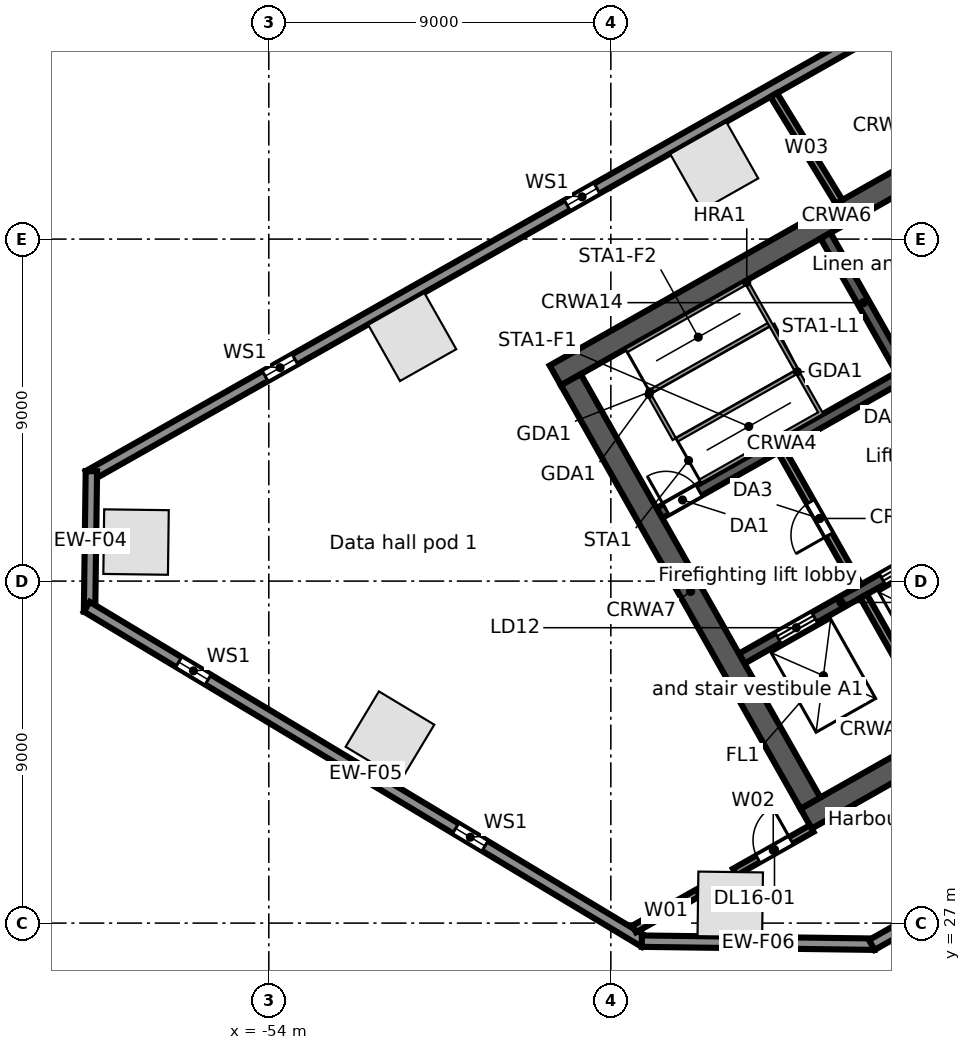
"""IFC4 building model, lengths in metres.
Left out: names, types, materials, properties, quantities, classifications, styles, units other than length and angle.
Written with IfcOpenShell. Run it as: python <this file> out.ifc"""

import sys

from ifc_helpers import new_model, si_unit, direction, frame, frame_2d, origin, origin_2d, place, context, subcontext, project, spatial, rectangle, extrude, element, fill, save


model = new_model("IFC4")
c1 = context("Model", 3, precision=1e-05, world=origin(), true_north=direction((0.0, 1.0)))
c2 = subcontext(c1, "Body", "Model", "MODEL_VIEW")
j1 = project(units=[si_unit("LENGTHUNIT", "METRE"), si_unit("PLANEANGLEUNIT", "RADIAN")], contexts=[c1])
p1 = place(None, origin())
s1 = spatial("IfcSite", under=j1, at=p1, CompositionType="ELEMENT")
p2 = place(p1, origin())
s2 = spatial("IfcBuilding", under=s1, at=p2, CompositionType="ELEMENT")
p3 = place(p2, frame((0.0, 0.0, 86.5)))
s3 = spatial("IfcBuildingStorey", under=s2, at=p3, CompositionType="ELEMENT", Elevation=86.5)
for number, where, z_axis, x_axis in (
    (1, (-42.28, 46.919, 0.0), (0.0, 0.0, 1.0), (-0.87, -0.492, 0.0)),
    (2, (-50.226, 42.423, 0.0), (0.0, 0.0, 1.0), (-0.87, -0.492, 0.0)),
    (3, (-57.493, 37.027, 0.0), (0.0, 0.0, 1.0), (-0.013, -1.0, 0.0)),
    (4, (-50.812, 31.931, 0.0), (0.0, 0.0, 1.0), (0.857, -0.515, 0.0)),
    (5, (-41.858, 27.495, 0.0), (0.0, 0.0, 1.0), (1.0, -0.013, 0.0)),
):
    element("IfcColumn", number, at=place(p3, frame(where, z_axis=z_axis, x_axis=x_axis)), inside=s3, PredefinedType="COLUMN", context=c2, shape_type="SweptSolid", body=[
        extrude(rectangle(XDim=1.7, YDim=1.7, at=origin_2d()), origin(), (0.0, 0.0, 1.0), 5.0),
    ])
p4 = place(p3, frame((-58.745, 38.764, 0.0), z_axis=(0.0, 0.0, 1.0), x_axis=(0.870355811726, 0.492423355453, 0.0)))
e6 = element("IfcWall", 6, at=p4, inside=s3, PredefinedType="STANDARD", context=c2, shape_type="SweptSolid", body=[
    extrude(rectangle(XDim=64.025, YDim=0.3, at=frame_2d((32.013, 0.0))), origin(), (0.0, 0.0, 1.0), 4.65),
])
p5 = place(p4, frame((60.122, 0.0, 0.6)))
e7 = element("IfcOpeningElement", 7, at=p5, cuts=e6, PredefinedType="OPENING", context=c2, shape_type="SweptSolid", body=[
    extrude(rectangle(XDim=0.9, YDim=3.2, at=frame_2d((0.45, 1.6))), frame((0.0, 0.16, 0.0), z_axis=(0.0, -1.0, 0.0), x_axis=(1.0, 0.0, 0.0)), (0.0, 0.0, 1.0), 0.32),
])
p6 = place(p4, frame((50.992, 0.0, 0.6)))
e8 = element("IfcOpeningElement", 8, at=p6, cuts=e6, PredefinedType="OPENING", context=c2, shape_type="SweptSolid", body=[
    extrude(rectangle(XDim=0.9, YDim=3.2, at=frame_2d((0.45, 1.6))), frame((0.0, 0.16, 0.0), z_axis=(0.0, -1.0, 0.0), x_axis=(1.0, 0.0, 0.0)), (0.0, 0.0, 1.0), 0.32),
])
p7 = place(p4, frame((41.862, 0.0, 0.6)))
e9 = element("IfcOpeningElement", 9, at=p7, cuts=e6, PredefinedType="OPENING", context=c2, shape_type="SweptSolid", body=[
    extrude(rectangle(XDim=0.9, YDim=3.2, at=frame_2d((0.45, 1.6))), frame((0.0, 0.16, 0.0), z_axis=(0.0, -1.0, 0.0), x_axis=(1.0, 0.0, 0.0)), (0.0, 0.0, 1.0), 0.32),
])
p8 = place(p4, frame((32.732, 0.0, 0.6)))
e10 = element("IfcOpeningElement", 10, at=p8, cuts=e6, PredefinedType="OPENING", context=c2, shape_type="SweptSolid", body=[
    extrude(rectangle(XDim=0.9, YDim=3.2, at=frame_2d((0.45, 1.6))), frame((0.0, 0.16, 0.0), z_axis=(0.0, -1.0, 0.0), x_axis=(1.0, 0.0, 0.0)), (0.0, 0.0, 1.0), 0.32),
])
p9 = place(p4, frame((23.602, 0.0, 0.6)))
e11 = element("IfcOpeningElement", 11, at=p9, cuts=e6, PredefinedType="OPENING", context=c2, shape_type="SweptSolid", body=[
    extrude(rectangle(XDim=0.9, YDim=3.2, at=frame_2d((0.45, 1.6))), frame((0.0, 0.16, 0.0), z_axis=(0.0, -1.0, 0.0), x_axis=(1.0, 0.0, 0.0)), (0.0, 0.0, 1.0), 0.32),
])
p10 = place(p4, frame((14.472, 0.0, 0.6)))
e12 = element("IfcOpeningElement", 12, at=p10, cuts=e6, PredefinedType="OPENING", context=c2, shape_type="SweptSolid", body=[
    extrude(rectangle(XDim=0.9, YDim=3.2, at=frame_2d((0.45, 1.6))), frame((0.0, 0.16, 0.0), z_axis=(0.0, -1.0, 0.0), x_axis=(1.0, 0.0, 0.0)), (0.0, 0.0, 1.0), 0.32),
])
p11 = place(p4, frame((5.342, 0.0, 0.6)))
e13 = element("IfcOpeningElement", 13, at=p11, cuts=e6, PredefinedType="OPENING", context=c2, shape_type="SweptSolid", body=[
    extrude(rectangle(XDim=0.9, YDim=3.2, at=frame_2d((0.45, 1.6))), frame((0.0, 0.16, 0.0), z_axis=(0.0, -1.0, 0.0), x_axis=(1.0, 0.0, 0.0)), (0.0, 0.0, 1.0), 0.32),
])
p12 = place(p3, frame((-58.717, 35.194, 0.0), z_axis=(0.0, 0.0, 1.0), x_axis=(0.013069053407, 0.999914596275, 0.0)))
e14 = element("IfcWall", 14, at=p12, inside=s3, PredefinedType="STANDARD", context=c2, shape_type="SweptSolid", body=[
    extrude(rectangle(XDim=3.699, YDim=0.3, at=frame_2d((1.849, 0.0))), origin(), (0.0, 0.0, 1.0), 4.65),
])
p13 = place(p3, frame((-44.109, 26.504, 0.0), z_axis=(0.0, 0.0, 1.0), x_axis=(-0.857169502585, 0.515034410344, 0.0)))
e15 = element("IfcWall", 15, at=p13, inside=s3, PredefinedType="STANDARD", context=c2, shape_type="SweptSolid", body=[
    extrude(rectangle(XDim=17.127, YDim=0.3, at=frame_2d((8.563, 0.0))), origin(), (0.0, 0.0, 1.0), 4.65),
])
p14 = place(p13, frame((13.403, 0.0, 0.6)))
e16 = element("IfcOpeningElement", 16, at=p14, cuts=e15, PredefinedType="OPENING", context=c2, shape_type="SweptSolid", body=[
    extrude(rectangle(XDim=0.9, YDim=3.2, at=frame_2d((0.45, 1.6))), frame((0.0, 0.16, 0.0), z_axis=(0.0, -1.0, 0.0), x_axis=(1.0, 0.0, 0.0)), (0.0, 0.0, 1.0), 0.32),
])
p15 = place(p13, frame((4.903, 0.0, 0.6)))
e17 = element("IfcOpeningElement", 17, at=p15, cuts=e15, PredefinedType="OPENING", context=c2, shape_type="SweptSolid", body=[
    extrude(rectangle(XDim=0.9, YDim=3.2, at=frame_2d((0.45, 1.6))), frame((0.0, 0.16, 0.0), z_axis=(0.0, -1.0, 0.0), x_axis=(1.0, 0.0, 0.0)), (0.0, 0.0, 1.0), 0.32),
])
p16 = place(p3, frame((-38.057, 26.445, 0.0), z_axis=(0.0, 0.0, 1.0), x_axis=(-0.999914086342, 0.013108010296, 0.0)))
e18 = element("IfcWall", 18, at=p16, inside=s3, PredefinedType="STANDARD", context=c2, shape_type="SweptSolid", body=[
    extrude(rectangle(XDim=6.128, YDim=0.3, at=frame_2d((3.064, 0.0))), origin(), (0.0, 0.0, 1.0), 4.65),
])
p17 = place(p3, frame((-0.055, 47.969, 0.0), z_axis=(0.0, 0.0, 1.0), x_axis=(-0.870355730478, -0.492423499058, 0.0)))
e19 = element("IfcWall", 19, at=p17, inside=s3, PredefinedType="STANDARD", context=c2, shape_type="SweptSolid", body=[
    extrude(rectangle(XDim=43.75, YDim=0.3, at=frame_2d((21.875, 0.0))), origin(), (0.0, 0.0, 1.0), 4.65),
])
p18 = place(p17, frame((39.977, 0.0, 0.6)))
e20 = element("IfcOpeningElement", 20, at=p18, cuts=e19, PredefinedType="OPENING", context=c2, shape_type="SweptSolid", body=[
    extrude(rectangle(XDim=0.9, YDim=3.2, at=frame_2d((0.45, 1.6))), frame((0.0, 0.16, 0.0), z_axis=(0.0, -1.0, 0.0), x_axis=(1.0, 0.0, 0.0)), (0.0, 0.0, 1.0), 0.32),
])
p19 = place(p17, frame((31.222, 0.0, 0.6)))
e21 = element("IfcOpeningElement", 21, at=p19, cuts=e19, PredefinedType="OPENING", context=c2, shape_type="SweptSolid", body=[
    extrude(rectangle(XDim=0.9, YDim=3.2, at=frame_2d((0.45, 1.6))), frame((0.0, 0.16, 0.0), z_axis=(0.0, -1.0, 0.0), x_axis=(1.0, 0.0, 0.0)), (0.0, 0.0, 1.0), 0.32),
])
p20 = place(p17, frame((22.468, 0.0, 0.6)))
e22 = element("IfcOpeningElement", 22, at=p20, cuts=e19, PredefinedType="OPENING", context=c2, shape_type="SweptSolid", body=[
    extrude(rectangle(XDim=0.9, YDim=3.2, at=frame_2d((0.45, 1.6))), frame((0.0, 0.16, 0.0), z_axis=(0.0, -1.0, 0.0), x_axis=(1.0, 0.0, 0.0)), (0.0, 0.0, 1.0), 0.32),
])
p21 = place(p17, frame((13.713, 0.0, 0.6)))
e23 = element("IfcOpeningElement", 23, at=p21, cuts=e19, PredefinedType="OPENING", context=c2, shape_type="SweptSolid", body=[
    extrude(rectangle(XDim=0.9, YDim=3.2, at=frame_2d((0.45, 1.6))), frame((0.0, 0.16, 0.0), z_axis=(0.0, -1.0, 0.0), x_axis=(1.0, 0.0, 0.0)), (0.0, 0.0, 1.0), 0.32),
])
p22 = place(p17, frame((4.959, 0.0, 0.6)))
e24 = element("IfcOpeningElement", 24, at=p22, cuts=e19, PredefinedType="OPENING", context=c2, shape_type="SweptSolid", body=[
    extrude(rectangle(XDim=0.9, YDim=3.2, at=frame_2d((0.45, 1.6))), frame((0.0, 0.16, 0.0), z_axis=(0.0, -1.0, 0.0), x_axis=(1.0, 0.0, 0.0)), (0.0, 0.0, 1.0), 0.32),
])
p23 = place(p3, frame((-39.862, 29.749, 0.0), z_axis=(0.0, 0.0, 1.0), x_axis=(0.870350116061, 0.492433422375, 0.0)))
e25 = element("IfcWall", 25, at=p23, inside=s3, PredefinedType="SOLIDWALL", context=c2, shape_type="SweptSolid", body=[
    extrude(rectangle(XDim=17.0, YDim=0.6, at=frame_2d((8.5, 0.0))), origin(), (0.0, 0.0, 1.0), 4.65),
])
p24 = place(p23, frame((7.2, 0.0, 0.0)))
e26 = element("IfcOpeningElement", 26, at=p24, cuts=e25, PredefinedType="OPENING", context=c2, shape_type="SweptSolid", body=[
    extrude(rectangle(XDim=1.2, YDim=2.1, at=frame_2d((0.6, 1.05))), frame((0.0, 0.31, 0.0), z_axis=(0.0, -1.0, 0.0), x_axis=(1.0, 0.0, 0.0)), (0.0, 0.0, 1.0), 0.62),
])
p25 = place(p3, frame((-41.556, 33.961, 0.0), z_axis=(0.0, 0.0, 1.0), x_axis=(0.870343731308, 0.492444706919, 0.0)))
e27 = element("IfcWall", 27, at=p25, inside=s3, PredefinedType="SOLIDWALL", context=c2, shape_type="SweptSolid", body=[
    extrude(rectangle(XDim=6.0, YDim=0.3, at=frame_2d((3.0, 0.0))), origin(), (0.0, 0.0, 1.0), 4.65),
])
p26 = place(p25, frame((1.1, 0.0, 0.0)))
e28 = element("IfcOpeningElement", 28, at=p26, cuts=e27, PredefinedType="OPENING", context=c2, shape_type="SweptSolid", body=[
    extrude(rectangle(XDim=1.1, YDim=2.1, at=frame_2d((0.55, 1.05))), frame((0.0, 0.16, 0.0), z_axis=(0.0, -1.0, 0.0), x_axis=(1.0, 0.0, 0.0)), (0.0, 0.0, 1.0), 0.32),
])
p27 = place(p25, frame((4.25, 0.0, 0.0)))
e29 = element("IfcOpeningElement", 29, at=p27, cuts=e27, PredefinedType="OPENING", context=c2, shape_type="SweptSolid", body=[
    extrude(rectangle(XDim=1.1, YDim=2.1, at=frame_2d((0.55, 1.05))), frame((0.0, 0.16, 0.0), z_axis=(0.0, -1.0, 0.0), x_axis=(1.0, 0.0, 0.0)), (0.0, 0.0, 1.0), 0.32),
])
p28 = place(p3, frame((-43.723, 37.791, 0.0), z_axis=(0.0, 0.0, 1.0), x_axis=(0.87035077051, 0.49243226567, 0.0)))
e30 = element("IfcWall", 30, at=p28, inside=s3, PredefinedType="SOLIDWALL", context=c2, shape_type="SweptSolid", body=[
    extrude(rectangle(XDim=7.4, YDim=0.3, at=frame_2d((3.7, 0.0))), origin(), (0.0, 0.0, 1.0), 4.65),
])
p29 = place(p28, frame((0.2, 0.0, 0.0)))
e31 = element("IfcOpeningElement", 31, at=p29, cuts=e30, PredefinedType="OPENING", context=c2, shape_type="SweptSolid", body=[
    extrude(rectangle(XDim=1.0, YDim=2.1, at=frame_2d((0.5, 1.05))), frame((0.0, 0.16, 0.0), z_axis=(0.0, -1.0, 0.0), x_axis=(1.0, 0.0, 0.0)), (0.0, 0.0, 1.0), 0.32),
])
p30 = place(p3, frame((-46.461, 41.412, 0.0), z_axis=(0.0, 0.0, 1.0), x_axis=(0.870350116061, 0.492433422375, 0.0)))
e32 = element("IfcWall", 32, at=p30, inside=s3, PredefinedType="SOLIDWALL", context=c2, shape_type="SweptSolid", body=[
    extrude(rectangle(XDim=17.0, YDim=0.6, at=frame_2d((8.5, 0.0))), origin(), (0.0, 0.0, 1.0), 4.65),
])
p31 = place(p3, frame((-46.052, 41.298, 0.0), z_axis=(0.0, 0.0, 1.0), x_axis=(0.492418598281, -0.870358503186, 0.0)))
e33 = element("IfcWall", 33, at=p31, inside=s3, PredefinedType="SOLIDWALL", context=c2, shape_type="SweptSolid", body=[
    extrude(rectangle(XDim=12.8, YDim=0.6, at=frame_2d((6.4, 0.0))), origin(), (0.0, 0.0, 1.0), 4.65),
])
p32 = place(p3, frame((-38.349, 35.603, 0.0), z_axis=(0.0, 0.0, 1.0), x_axis=(0.49241474071, -0.870360685654, 0.0)))
e34 = element("IfcWall", 34, at=p32, inside=s3, PredefinedType="SOLIDWALL", context=c2, shape_type="SweptSolid", body=[
    extrude(rectangle(XDim=4.05, YDim=0.2, at=frame_2d((2.025, 0.0))), origin(), (0.0, 0.0, 1.0), 4.65),
])
p33 = place(p3, frame((-40.516, 39.433, 0.0), z_axis=(0.0, 0.0, 1.0), x_axis=(0.492453559952, -0.87033872216, 0.0)))
e35 = element("IfcWall", 35, at=p33, inside=s3, PredefinedType="PARTITIONING", context=c2, shape_type="SweptSolid", body=[
    extrude(rectangle(XDim=4.1, YDim=0.2, at=frame_2d((2.05, 0.0))), origin(), (0.0, 0.0, 1.0), 4.65),
])
p34 = place(p33, frame((1.55, 0.0, 0.0)))
e36 = element("IfcOpeningElement", 36, at=p34, cuts=e35, PredefinedType="OPENING", context=c2, shape_type="SweptSolid", body=[
    extrude(rectangle(XDim=1.0, YDim=2.1, at=frame_2d((0.5, 1.05))), frame((0.0, 0.11, 0.0), z_axis=(0.0, -1.0, 0.0), x_axis=(1.0, 0.0, 0.0)), (0.0, 0.0, 1.0), 0.22),
])
p35 = place(p3, frame((-39.35, 45.09, 0.0), z_axis=(0.0, 0.0, 1.0), x_axis=(0.49241474071, -0.870360685654, 0.0)))
e37 = element("IfcWall", 37, at=p35, inside=s3, PredefinedType="SOLIDWALL", context=c2, shape_type="SweptSolid", body=[
    extrude(rectangle(XDim=4.05, YDim=0.3, at=frame_2d((2.025, 0.0))), origin(), (0.0, 0.0, 1.0), 4.65),
])
p36 = place(p3, frame((-44.386, 26.845, 0.0), z_axis=(0.0, 0.0, 1.0), x_axis=(0.870226201187, 0.492652371118, 0.0)))
e38 = element("IfcWall", 38, at=p36, inside=s3, PredefinedType="PARTITIONING", context=c2, shape_type="SweptSolid", body=[
    extrude(rectangle(XDim=1.933, YDim=0.2, at=frame_2d((0.966, 0.0))), origin(), (0.0, 0.0, 1.0), 4.65),
])
p37 = place(p3, frame((-41.738, 28.343, 0.0), z_axis=(0.0, 0.0, 1.0), x_axis=(0.870265350095, 0.492583211676, 0.0)))
e39 = element("IfcWall", 39, at=p37, inside=s3, PredefinedType="PARTITIONING", context=c2, shape_type="SweptSolid", body=[
    extrude(rectangle(XDim=2.324, YDim=0.2, at=frame_2d((1.162, 0.0))), origin(), (0.0, 0.0, 1.0), 3.83),
])
p38 = place(p37, frame((0.7, 0.0, 0.0)))
e40 = element("IfcOpeningElement", 40, at=p38, cuts=e39, PredefinedType="OPENING", context=c2, shape_type="SweptSolid", body=[
    extrude(rectangle(XDim=1.0, YDim=2.1, at=frame_2d((0.5, 1.05))), frame((0.0, 0.11, 0.0), z_axis=(0.0, -1.0, 0.0), x_axis=(1.0, 0.0, 0.0)), (0.0, 0.0, 1.0), 0.22),
])
p39 = place(p3, frame((-40.713, 48.794, 0.0), z_axis=(0.0, 0.0, 1.0), x_axis=(0.52165366254, -0.853157345604, 0.0)))
e41 = element("IfcWall", 41, at=p39, inside=s3, PredefinedType="PARTITIONING", context=c2, shape_type="SweptSolid", body=[
    extrude(rectangle(XDim=3.297, YDim=0.2, at=frame_2d((1.648, 0.0))), origin(), (0.0, 0.0, 1.0), 3.83),
])
p40 = place(p10, origin())
e42 = element("IfcWindow", 42, at=p40, inside=s3, PartitioningType="SINGLE_PANEL", PredefinedType="WINDOW", context=c2, shape_type="SweptSolid", body=[
    extrude(rectangle(XDim=0.9, YDim=3.2, at=frame_2d((0.45, 1.6))), frame((0.0, 0.03, 0.0), z_axis=(0.0, -1.0, 0.0), x_axis=(1.0, 0.0, 0.0)), (0.0, 0.0, 1.0), 0.06),
])
fill(e12, e42)
p41 = place(p11, origin())
e43 = element("IfcWindow", 43, at=p41, inside=s3, PartitioningType="SINGLE_PANEL", PredefinedType="WINDOW", context=c2, shape_type="SweptSolid", body=[
    extrude(rectangle(XDim=0.9, YDim=3.2, at=frame_2d((0.45, 1.6))), frame((0.0, 0.03, 0.0), z_axis=(0.0, -1.0, 0.0), x_axis=(1.0, 0.0, 0.0)), (0.0, 0.0, 1.0), 0.06),
])
fill(e13, e43)
p42 = place(p14, origin())
e44 = element("IfcWindow", 44, at=p42, inside=s3, PartitioningType="SINGLE_PANEL", PredefinedType="WINDOW", context=c2, shape_type="SweptSolid", body=[
    extrude(rectangle(XDim=0.9, YDim=3.2, at=frame_2d((0.45, 1.6))), frame((0.0, 0.03, 0.0), z_axis=(0.0, -1.0, 0.0), x_axis=(1.0, 0.0, 0.0)), (0.0, 0.0, 1.0), 0.06),
])
fill(e16, e44)
p43 = place(p15, origin())
e45 = element("IfcWindow", 45, at=p43, inside=s3, PartitioningType="SINGLE_PANEL", PredefinedType="WINDOW", context=c2, shape_type="SweptSolid", body=[
    extrude(rectangle(XDim=0.9, YDim=3.2, at=frame_2d((0.45, 1.6))), frame((0.0, 0.03, 0.0), z_axis=(0.0, -1.0, 0.0), x_axis=(1.0, 0.0, 0.0)), (0.0, 0.0, 1.0), 0.06),
])
fill(e17, e45)
p44 = place(p26, origin())
e46 = element("IfcDoor", 46, at=p44, inside=s3, OperationType="DOUBLE_DOOR_SLIDING", PredefinedType="DOOR", context=c2, shape_type="SweptSolid", body=[
    extrude(rectangle(XDim=1.1, YDim=2.1, at=frame_2d((0.55, 1.05))), frame((0.0, 0.025, 0.0), z_axis=(0.0, -1.0, 0.0), x_axis=(1.0, 0.0, 0.0)), (0.0, 0.0, 1.0), 0.05),
])
fill(e28, e46)
p45 = place(p27, origin())
e47 = element("IfcDoor", 47, at=p45, inside=s3, OperationType="DOUBLE_DOOR_SLIDING", PredefinedType="DOOR", context=c2, shape_type="SweptSolid", body=[
    extrude(rectangle(XDim=1.1, YDim=2.1, at=frame_2d((0.55, 1.05))), frame((0.0, 0.025, 0.0), z_axis=(0.0, -1.0, 0.0), x_axis=(1.0, 0.0, 0.0)), (0.0, 0.0, 1.0), 0.05),
])
fill(e29, e47)
p46 = place(p29, origin())
e48 = element("IfcDoor", 48, at=p46, inside=s3, OperationType="SINGLE_SWING_LEFT", PredefinedType="DOOR", context=c2, shape_type="SweptSolid", body=[
    extrude(rectangle(XDim=1.0, YDim=2.1, at=frame_2d((0.5, 1.05))), frame((0.0, 0.025, 0.0), z_axis=(0.0, -1.0, 0.0), x_axis=(1.0, 0.0, 0.0)), (0.0, 0.0, 1.0), 0.05),
])
fill(e31, e48)
p47 = place(p34, frame((1.0, 0.0, 0.0), z_axis=(0.0, 0.0, 1.0), x_axis=(-1.0, 0.0, 0.0)))
e49 = element("IfcDoor", 49, at=p47, inside=s3, OperationType="SINGLE_SWING_LEFT", PredefinedType="DOOR", context=c2, shape_type="SweptSolid", body=[
    extrude(rectangle(XDim=1.0, YDim=2.1, at=frame_2d((0.5, 1.05))), frame((0.0, 0.025, 0.0), z_axis=(0.0, -1.0, 0.0), x_axis=(1.0, 0.0, 0.0)), (0.0, 0.0, 1.0), 0.05),
])
fill(e36, e49)
p48 = place(p38, origin())
e50 = element("IfcDoor", 50, at=p48, inside=s3, OperationType="SINGLE_SWING_RIGHT", PredefinedType="DOOR", context=c2, shape_type="SweptSolid", body=[
    extrude(rectangle(XDim=1.0, YDim=2.1, at=frame_2d((0.5, 1.05))), frame((0.0, 0.025, 0.0), z_axis=(0.0, -1.0, 0.0), x_axis=(1.0, 0.0, 0.0)), (0.0, 0.0, 1.0), 0.05),
])
fill(e40, e50)
save(model, sys.argv[1])
